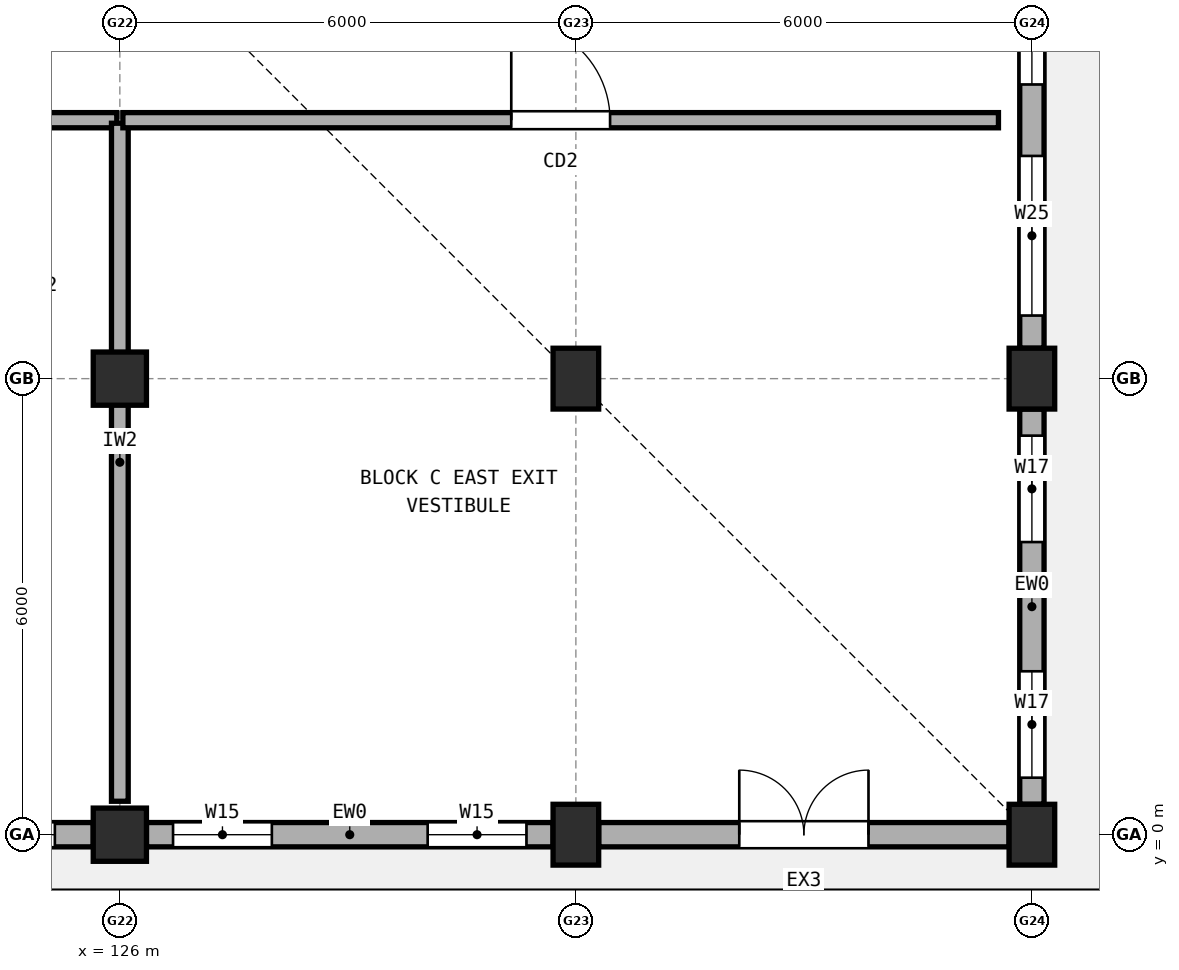
"""IFC4 building model, lengths in metres.
Left out: names, types, materials, properties, quantities, classifications, styles, units other than length and angle.
Written with IfcOpenShell. Run it as: python <this file> out.ifc"""

import sys

from ifc_helpers import new_model, si_unit, direction, frame, frame_2d, origin, origin_2d, place, context, subcontext, project, spatial, rectangle, extrude, element, fill, save


model = new_model("IFC4")
c1 = context("Model", 3, precision=1e-05, world=origin(), true_north=direction((0.0, 1.0)))
c2 = subcontext(c1, "Body", "Model", "MODEL_VIEW")
j1 = project(units=[si_unit("LENGTHUNIT", "METRE"), si_unit("PLANEANGLEUNIT", "RADIAN")], contexts=[c1])
p1 = place(None, origin())
s1 = spatial("IfcSite", under=j1, at=p1, CompositionType="ELEMENT")
p2 = place(p1, origin())
s2 = spatial("IfcBuilding", under=s1, at=p2, CompositionType="ELEMENT")
p3 = place(p2, origin())
s3 = spatial("IfcBuildingStorey", under=s2, at=p3, CompositionType="ELEMENT", Elevation=0.0)
for number, where, z_axis, x_axis in (
    (1, (126.0, 0.0, 0.0), (0.0, 0.0, 1.0), (1.0, 0.0, 0.0)),
    (2, (126.0, 6.0, 0.0), (0.0, 0.0, 1.0), (1.0, 0.0, 0.0)),
):
    element("IfcColumn", number, at=place(p3, frame(where, z_axis=z_axis, x_axis=x_axis)), inside=s3, PredefinedType="COLUMN", context=c2, shape_type="SweptSolid", body=[
        extrude(rectangle(XDim=0.7, YDim=0.7, at=origin_2d()), origin(), (0.0, 0.0, 1.0), 4.23),
    ])
for number, where, z_axis, x_axis in (
    (3, (132.0, 0.0, 0.0), (0.0, 0.0, 1.0), (1.0, 0.0, 0.0)),
    (4, (132.0, 6.0, 0.0), (0.0, 0.0, 1.0), (1.0, 0.0, 0.0)),
    (5, (138.0, 0.0, 0.0), (0.0, 0.0, 1.0), (1.0, 0.0, 0.0)),
    (6, (138.0, 6.0, 0.0), (0.0, 0.0, 1.0), (1.0, 0.0, 0.0)),
):
    element("IfcColumn", number, at=place(p3, frame(where, z_axis=z_axis, x_axis=x_axis)), inside=s3, PredefinedType="COLUMN", context=c2, shape_type="SweptSolid", body=[
        extrude(rectangle(XDim=0.6, YDim=0.8, at=origin_2d()), origin(), (0.0, 0.0, 1.0), 4.23),
    ])
p4 = place(p3, frame((120.35, 0.0, 0.0), z_axis=(0.0, 0.0, 1.0), x_axis=(1.0, 0.0, 0.0)))
e7 = element("IfcWall", 7, at=p4, inside=s3, PredefinedType="STANDARD", context=c2, shape_type="SweptSolid", body=[
    extrude(rectangle(XDim=5.3, YDim=0.32, at=frame_2d((2.65, 0.0))), origin(), (0.0, 0.0, 1.0), 3.562),
])
p5 = place(p4, frame((0.255, 0.0, 0.9)))
e8 = element("IfcOpeningElement", 8, at=p5, cuts=e7, PredefinedType="OPENING", context=c2, shape_type="SweptSolid", body=[
    extrude(rectangle(XDim=2.1, YDim=1.55, at=frame_2d((1.05, 0.775))), frame((0.0, 0.17, 0.0), z_axis=(0.0, -1.0, 0.0), x_axis=(1.0, 0.0, 0.0)), (0.0, 0.0, 1.0), 0.34),
])
p6 = place(p4, frame((3.195, 0.0, 0.9)))
e9 = element("IfcOpeningElement", 9, at=p6, cuts=e7, PredefinedType="OPENING", context=c2, shape_type="SweptSolid", body=[
    extrude(rectangle(XDim=1.6, YDim=1.5, at=frame_2d((0.8, 0.75))), frame((0.0, 0.17, 0.0), z_axis=(0.0, -1.0, 0.0), x_axis=(1.0, 0.0, 0.0)), (0.0, 0.0, 1.0), 0.34),
])
p7 = place(p3, frame((126.35, 0.0, 0.0), z_axis=(0.0, 0.0, 1.0), x_axis=(1.0, 0.0, 0.0)))
e10 = element("IfcWall", 10, at=p7, inside=s3, PredefinedType="STANDARD", context=c2, shape_type="SweptSolid", body=[
    extrude(rectangle(XDim=5.35, YDim=0.32, at=frame_2d((2.675, 0.0))), origin(), (0.0, 0.0, 1.0), 3.562),
])
p8 = place(p7, frame((0.35, 0.0, 0.9)))
e11 = element("IfcOpeningElement", 11, at=p8, cuts=e10, PredefinedType="OPENING", context=c2, shape_type="SweptSolid", body=[
    extrude(rectangle(XDim=1.3, YDim=1.45, at=frame_2d((0.65, 0.725))), frame((0.0, 0.17, 0.0), z_axis=(0.0, -1.0, 0.0), x_axis=(1.0, 0.0, 0.0)), (0.0, 0.0, 1.0), 0.34),
])
p9 = place(p7, frame((3.7, 0.0, 0.9)))
e12 = element("IfcOpeningElement", 12, at=p9, cuts=e10, PredefinedType="OPENING", context=c2, shape_type="SweptSolid", body=[
    extrude(rectangle(XDim=1.3, YDim=1.45, at=frame_2d((0.65, 0.725))), frame((0.0, 0.17, 0.0), z_axis=(0.0, -1.0, 0.0), x_axis=(1.0, 0.0, 0.0)), (0.0, 0.0, 1.0), 0.34),
])
p10 = place(p3, frame((132.3, 0.0, 0.0), z_axis=(0.0, 0.0, 1.0), x_axis=(1.0, 0.0, 0.0)))
e13 = element("IfcWall", 13, at=p10, inside=s3, PredefinedType="STANDARD", context=c2, shape_type="SweptSolid", body=[
    extrude(rectangle(XDim=5.4, YDim=0.32, at=frame_2d((2.7, 0.0))), origin(), (0.0, 0.0, 1.0), 3.562),
])
p11 = place(p10, frame((1.85, 0.0, 0.0)))
e14 = element("IfcOpeningElement", 14, at=p11, cuts=e13, PredefinedType="OPENING", context=c2, shape_type="SweptSolid", body=[
    extrude(rectangle(XDim=1.7, YDim=2.2, at=frame_2d((0.85, 1.1))), frame((0.0, 0.17, 0.0), z_axis=(0.0, -1.0, 0.0), x_axis=(1.0, 0.0, 0.0)), (0.0, 0.0, 1.0), 0.34),
])
p12 = place(p3, frame((138.0, 0.4, 0.0), z_axis=(0.0, 0.0, 1.0), x_axis=(0.0, 1.0, 0.0)))
e15 = element("IfcWall", 15, at=p12, inside=s3, PredefinedType="STANDARD", context=c2, shape_type="SweptSolid", body=[
    extrude(rectangle(XDim=5.2, YDim=0.32, at=frame_2d((2.6, 0.0))), origin(), (0.0, 0.0, 1.0), 3.712),
])
p13 = place(p12, frame((0.35, 0.0, 0.9)))
e16 = element("IfcOpeningElement", 16, at=p13, cuts=e15, PredefinedType="OPENING", context=c2, shape_type="SweptSolid", body=[
    extrude(rectangle(XDim=1.4, YDim=1.5, at=frame_2d((0.7, 0.75))), frame((0.0, 0.17, 0.0), z_axis=(0.0, -1.0, 0.0), x_axis=(1.0, 0.0, 0.0)), (0.0, 0.0, 1.0), 0.34),
])
p14 = place(p12, frame((3.45, 0.0, 0.9)))
e17 = element("IfcOpeningElement", 17, at=p14, cuts=e15, PredefinedType="OPENING", context=c2, shape_type="SweptSolid", body=[
    extrude(rectangle(XDim=1.4, YDim=1.5, at=frame_2d((0.7, 0.75))), frame((0.0, 0.17, 0.0), z_axis=(0.0, -1.0, 0.0), x_axis=(1.0, 0.0, 0.0)), (0.0, 0.0, 1.0), 0.34),
])
p15 = place(p3, frame((138.0, 6.4, 0.0), z_axis=(0.0, 0.0, 1.0), x_axis=(0.0, 1.0, 0.0)))
e18 = element("IfcWall", 18, at=p15, inside=s3, PredefinedType="STANDARD", context=c2, shape_type="SweptSolid", body=[
    extrude(rectangle(XDim=5.2, YDim=0.32, at=frame_2d((2.6, 0.0))), origin(), (0.0, 0.0, 1.0), 3.712),
])
p16 = place(p15, frame((0.43, 0.0, 0.9)))
e19 = element("IfcOpeningElement", 19, at=p16, cuts=e18, PredefinedType="OPENING", context=c2, shape_type="SweptSolid", body=[
    extrude(rectangle(XDim=2.1, YDim=1.55, at=frame_2d((1.05, 0.775))), frame((0.0, 0.17, 0.0), z_axis=(0.0, -1.0, 0.0), x_axis=(1.0, 0.0, 0.0)), (0.0, 0.0, 1.0), 0.34),
])
p17 = place(p15, frame((3.47, 0.0, 0.9)))
e20 = element("IfcOpeningElement", 20, at=p17, cuts=e18, PredefinedType="OPENING", context=c2, shape_type="SweptSolid", body=[
    extrude(rectangle(XDim=1.3, YDim=1.45, at=frame_2d((0.65, 0.725))), frame((0.0, 0.17, 0.0), z_axis=(0.0, -1.0, 0.0), x_axis=(1.0, 0.0, 0.0)), (0.0, 0.0, 1.0), 0.34),
])
p18 = place(p3, frame((123.04, 9.4, 0.0), z_axis=(0.0, 0.0, 1.0), x_axis=(1.0, 0.0, 0.0)))
e21 = element("IfcWall", 21, at=p18, inside=s3, PredefinedType="SOLIDWALL", context=c2, shape_type="SweptSolid", body=[
    extrude(rectangle(XDim=2.92, YDim=0.2, at=frame_2d((1.46, 0.0))), origin(), (0.0, 0.0, 1.0), 3.612),
])
p19 = place(p3, frame((126.0, 0.44, 0.0), z_axis=(0.0, 0.0, 1.0), x_axis=(0.0, 1.0, 0.0)))
e22 = element("IfcWall", 22, at=p19, inside=s3, PredefinedType="SOLIDWALL", context=c2, shape_type="SweptSolid", body=[
    extrude(rectangle(XDim=8.92, YDim=0.22, at=frame_2d((4.46, 0.0))), origin(), (0.0, 0.0, 1.0), 3.612),
])
p20 = place(p3, frame((126.04, 9.4, 0.0), z_axis=(0.0, 0.0, 1.0), x_axis=(1.0, 0.0, 0.0)))
e23 = element("IfcWall", 23, at=p20, inside=s3, PredefinedType="SOLIDWALL", context=c2, shape_type="SweptSolid", body=[
    extrude(rectangle(XDim=11.52, YDim=0.2, at=frame_2d((5.76, 0.0))), origin(), (0.0, 0.0, 1.0), 3.612),
])
p21 = place(p20, frame((5.11, 0.0, 0.0)))
e24 = element("IfcOpeningElement", 24, at=p21, cuts=e23, PredefinedType="OPENING", context=c2, shape_type="SweptSolid", body=[
    extrude(rectangle(XDim=1.3, YDim=2.15, at=frame_2d((0.65, 1.075))), frame((0.0, 0.11, 0.0), z_axis=(0.0, -1.0, 0.0), x_axis=(1.0, 0.0, 0.0)), (0.0, 0.0, 1.0), 0.22),
])
p22 = place(p6, origin())
e25 = element("IfcWindow", 25, at=p22, inside=s3, PartitioningType="SINGLE_PANEL", PredefinedType="WINDOW", context=c2, shape_type="SweptSolid", body=[
    extrude(rectangle(XDim=1.6, YDim=1.5, at=frame_2d((0.8, 0.75))), frame((0.0, 0.03, 0.0), z_axis=(0.0, -1.0, 0.0), x_axis=(1.0, 0.0, 0.0)), (0.0, 0.0, 1.0), 0.06),
])
fill(e9, e25)
p23 = place(p8, origin())
e26 = element("IfcWindow", 26, at=p23, inside=s3, PartitioningType="SINGLE_PANEL", PredefinedType="WINDOW", context=c2, shape_type="SweptSolid", body=[
    extrude(rectangle(XDim=1.3, YDim=1.45, at=frame_2d((0.65, 0.725))), frame((0.0, 0.03, 0.0), z_axis=(0.0, -1.0, 0.0), x_axis=(1.0, 0.0, 0.0)), (0.0, 0.0, 1.0), 0.06),
])
fill(e11, e26)
p24 = place(p9, origin())
e27 = element("IfcWindow", 27, at=p24, inside=s3, PartitioningType="SINGLE_PANEL", PredefinedType="WINDOW", context=c2, shape_type="SweptSolid", body=[
    extrude(rectangle(XDim=1.3, YDim=1.45, at=frame_2d((0.65, 0.725))), frame((0.0, 0.03, 0.0), z_axis=(0.0, -1.0, 0.0), x_axis=(1.0, 0.0, 0.0)), (0.0, 0.0, 1.0), 0.06),
])
fill(e12, e27)
p25 = place(p11, frame((1.7, 0.0, 0.0), z_axis=(0.0, 0.0, 1.0), x_axis=(-1.0, 0.0, 0.0)))
e28 = element("IfcDoor", 28, at=p25, inside=s3, OperationType="DOUBLE_DOOR_SINGLE_SWING", PredefinedType="DOOR", context=c2, shape_type="SweptSolid", body=[
    extrude(rectangle(XDim=1.7, YDim=2.2, at=frame_2d((0.85, 1.1))), frame((0.0, 0.025, 0.0), z_axis=(0.0, -1.0, 0.0), x_axis=(1.0, 0.0, 0.0)), (0.0, 0.0, 1.0), 0.05),
])
fill(e14, e28)
p26 = place(p13, origin())
e29 = element("IfcWindow", 29, at=p26, inside=s3, PartitioningType="SINGLE_PANEL", PredefinedType="WINDOW", context=c2, shape_type="SweptSolid", body=[
    extrude(rectangle(XDim=1.4, YDim=1.5, at=frame_2d((0.7, 0.75))), frame((0.0, 0.03, 0.0), z_axis=(0.0, -1.0, 0.0), x_axis=(1.0, 0.0, 0.0)), (0.0, 0.0, 1.0), 0.06),
])
fill(e16, e29)
p27 = place(p14, origin())
e30 = element("IfcWindow", 30, at=p27, inside=s3, PartitioningType="SINGLE_PANEL", PredefinedType="WINDOW", context=c2, shape_type="SweptSolid", body=[
    extrude(rectangle(XDim=1.4, YDim=1.5, at=frame_2d((0.7, 0.75))), frame((0.0, 0.03, 0.0), z_axis=(0.0, -1.0, 0.0), x_axis=(1.0, 0.0, 0.0)), (0.0, 0.0, 1.0), 0.06),
])
fill(e17, e30)
p28 = place(p16, origin())
e31 = element("IfcWindow", 31, at=p28, inside=s3, PartitioningType="SINGLE_PANEL", PredefinedType="WINDOW", context=c2, shape_type="SweptSolid", body=[
    extrude(rectangle(XDim=2.1, YDim=1.55, at=frame_2d((1.05, 0.775))), frame((0.0, 0.03, 0.0), z_axis=(0.0, -1.0, 0.0), x_axis=(1.0, 0.0, 0.0)), (0.0, 0.0, 1.0), 0.06),
])
fill(e19, e31)
p29 = place(p17, origin())
e32 = element("IfcWindow", 32, at=p29, inside=s3, PartitioningType="SINGLE_PANEL", PredefinedType="WINDOW", context=c2, shape_type="SweptSolid", body=[
    extrude(rectangle(XDim=1.3, YDim=1.45, at=frame_2d((0.65, 0.725))), frame((0.0, 0.03, 0.0), z_axis=(0.0, -1.0, 0.0), x_axis=(1.0, 0.0, 0.0)), (0.0, 0.0, 1.0), 0.06),
])
fill(e20, e32)
p30 = place(p21, origin())
e33 = element("IfcDoor", 33, at=p30, inside=s3, OperationType="SINGLE_SWING_LEFT", PredefinedType="DOOR", context=c2, shape_type="SweptSolid", body=[
    extrude(rectangle(XDim=1.3, YDim=2.15, at=frame_2d((0.65, 1.075))), frame((0.0, 0.025, 0.0), z_axis=(0.0, -1.0, 0.0), x_axis=(1.0, 0.0, 0.0)), (0.0, 0.0, 1.0), 0.05),
])
fill(e24, e33)
save(model, sys.argv[1])
